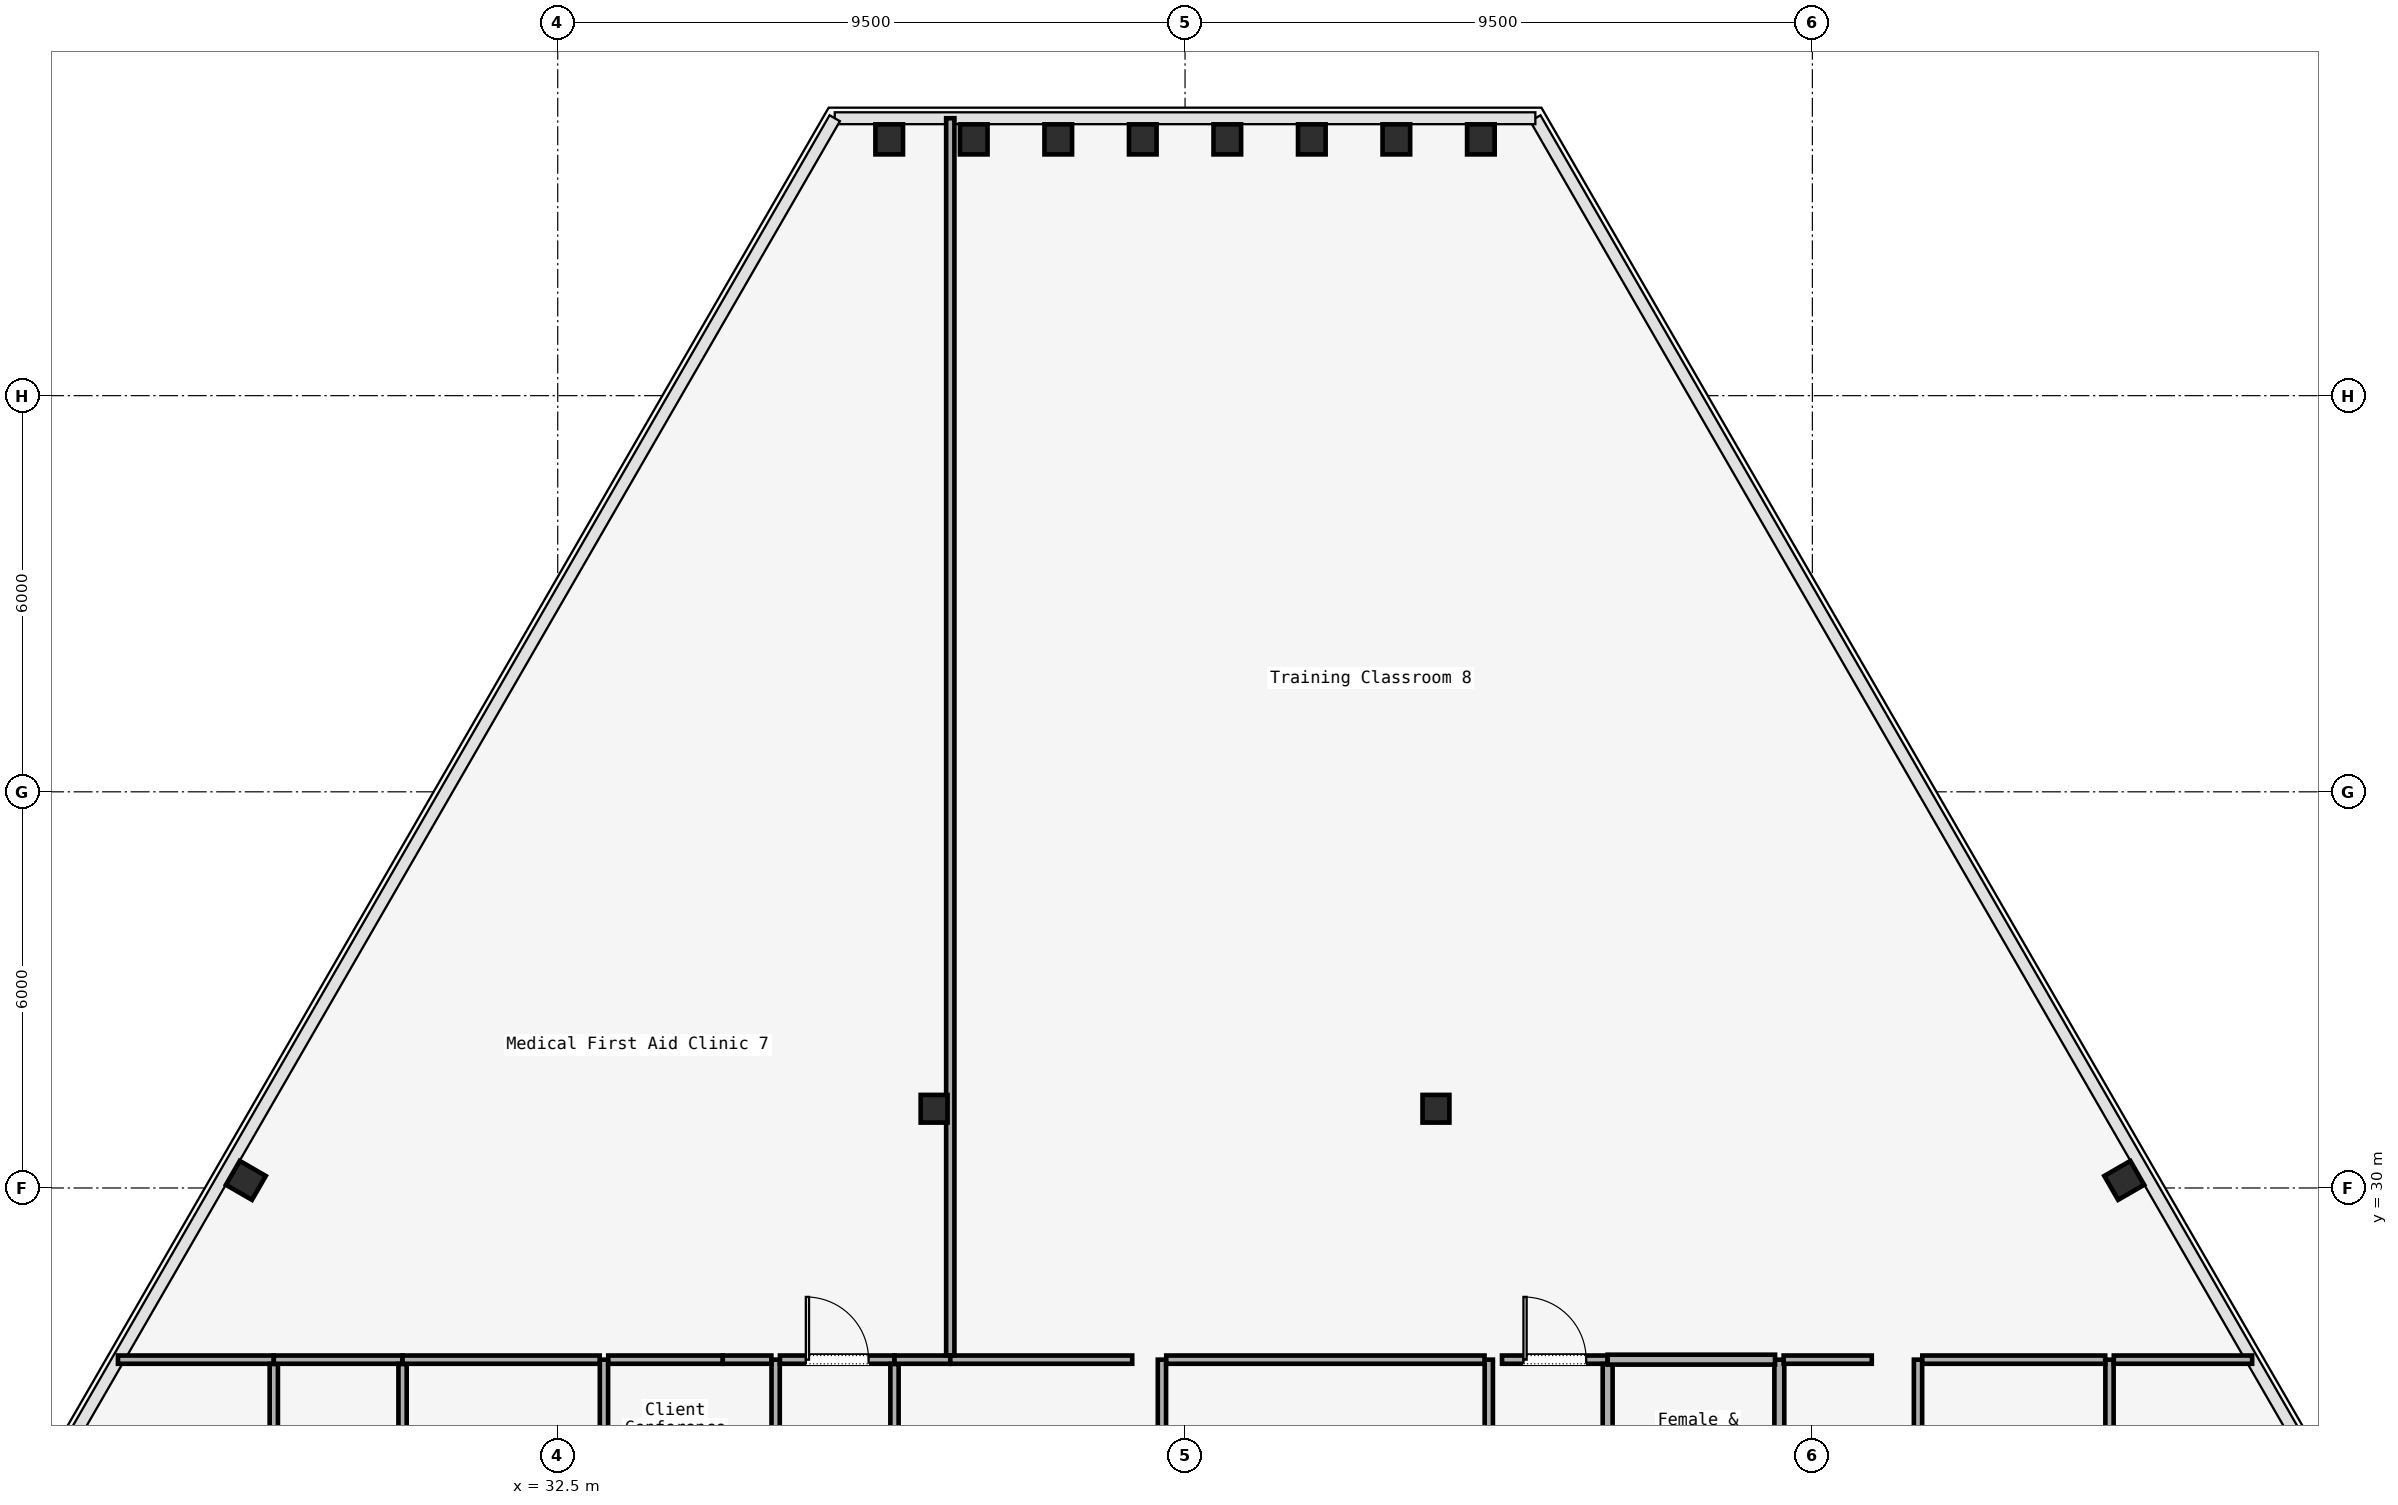
"""IFC4 building model, lengths in metres.
Left out: names, types, materials, properties, quantities, classifications, styles, units other than length and angle.
Written with IfcOpenShell. Run it as: python <this file> out.ifc"""

import sys

from ifc_helpers import new_model, si_unit, direction, frame, frame_2d, origin, origin_2d, place, context, subcontext, project, spatial, rectangle, i_section, extrude, element, fill, save


model = new_model("IFC4")
c1 = context("Model", 3, precision=1e-05, world=origin(), true_north=direction((0.0, 1.0)))
c2 = subcontext(c1, "Body", "Model", "MODEL_VIEW")
j1 = project(units=[si_unit("LENGTHUNIT", "METRE"), si_unit("PLANEANGLEUNIT", "RADIAN")], contexts=[c1])
p1 = place(None, origin())
s1 = spatial("IfcSite", under=j1, at=p1, CompositionType="ELEMENT")
p2 = place(p1, origin())
s2 = spatial("IfcBuilding", under=s1, at=p2, CompositionType="ELEMENT")
p3 = place(p2, frame((0.0, 0.0, 161.2)))
s3 = spatial("IfcBuildingStorey", under=s2, at=p3, CompositionType="ELEMENT", Elevation=161.2)
for number, where, z_axis, x_axis in (
    (1, (38.2, 31.2, 0.0), (0.0, 0.0, 1.0), (1.0, 0.0, 0.0)),
    (2, (45.8, 31.2, 0.0), (0.0, 0.0, 1.0), (1.0, 0.0, 0.0)),
):
    element("IfcColumn", number, at=place(p3, frame(where, z_axis=z_axis, x_axis=x_axis)), inside=s3, PredefinedType="COLUMN", context=c2, shape_type="SweptSolid", body=[
        extrude(i_section(OverallWidth=0.407, OverallDepth=0.419, WebThickness=0.031, FlangeThickness=0.049, FilletRadius=0.015, at=origin_2d()), origin(), (0.0, 0.0, 1.0), 3.58),
    ])
for number, where, z_axis, x_axis in (
    (3, (56.223, 30.115, 0.0), (0.0, 0.0, 1.0), (-0.5, 0.866, 0.0)),
    (4, (46.48, 45.882, 0.0), (0.0, 0.0, 1.0), (1.0, 0.0, 0.0)),
    (5, (45.2, 45.882, 0.0), (0.0, 0.0, 1.0), (1.0, 0.0, 0.0)),
    (6, (43.92, 45.882, 0.0), (0.0, 0.0, 1.0), (1.0, 0.0, 0.0)),
    (7, (42.64, 45.882, 0.0), (0.0, 0.0, 1.0), (1.0, 0.0, 0.0)),
    (8, (41.36, 45.882, 0.0), (0.0, 0.0, 1.0), (1.0, 0.0, 0.0)),
    (9, (40.08, 45.882, 0.0), (0.0, 0.0, 1.0), (1.0, 0.0, 0.0)),
    (10, (38.8, 45.882, 0.0), (0.0, 0.0, 1.0), (1.0, 0.0, 0.0)),
    (11, (37.52, 45.882, 0.0), (0.0, 0.0, 1.0), (1.0, 0.0, 0.0)),
    (12, (27.777, 30.115, 0.0), (0.0, 0.0, 1.0), (0.5, 0.866, 0.0)),
):
    element("IfcColumn", number, at=place(p3, frame(where, z_axis=z_axis, x_axis=x_axis)), inside=s3, PredefinedType="COLUMN", context=c2, shape_type="SweptSolid", body=[
        extrude(i_section(OverallWidth=0.418, OverallDepth=0.455, WebThickness=0.042, FlangeThickness=0.052, FilletRadius=0.015, at=origin_2d()), origin(), (0.0, 0.0, 1.0), 3.58),
    ])
p4 = place(p3, frame((35.8, 21.368, 0.0), z_axis=(0.0, 0.0, 1.0), x_axis=(0.0, 1.0, 0.0)))
e13 = element("IfcWall", 13, at=p4, inside=s3, PredefinedType="PARTITIONING", context=c2, shape_type="SweptSolid", body=[
    extrude(rectangle(XDim=6.032, YDim=0.125, at=frame_2d((3.016, 0.0))), origin(), (0.0, 0.0, 1.0), 3.01),
])
p5 = place(p4, frame((2.766, 0.0, 0.0)))
e14 = element("IfcOpeningElement", 14, at=p5, cuts=e13, PredefinedType="OPENING", context=c2, shape_type="SweptSolid", body=[
    extrude(rectangle(XDim=1.4, YDim=2.2, at=frame_2d((0.7, 1.1))), frame((0.0, 0.062, 0.0), z_axis=(0.0, -1.0, 0.0), x_axis=(1.0, 0.0, 0.0)), (0.0, 0.0, 1.0), 0.125),
])
p6 = place(p3, frame((35.865, 27.4, 0.0), z_axis=(0.0, 0.0, 1.0), x_axis=(1.0, 0.0, 0.0)))
e15 = element("IfcWall", 15, at=p6, inside=s3, PredefinedType="PARTITIONING", context=c2, shape_type="SweptSolid", body=[
    extrude(rectangle(XDim=1.735, YDim=0.125, at=frame_2d((0.868, 0.0))), origin(), (0.0, 0.0, 1.0), 3.01),
])
p7 = place(p6, frame((0.393, 0.0, 0.0)))
e16 = element("IfcOpeningElement", 16, at=p7, cuts=e15, PredefinedType="OPENING", context=c2, shape_type="SweptSolid", body=[
    extrude(rectangle(XDim=0.95, YDim=2.2, at=frame_2d((0.475, 1.1))), frame((0.0, 0.062, 0.0), z_axis=(0.0, -1.0, 0.0), x_axis=(1.0, 0.0, 0.0)), (0.0, 0.0, 1.0), 0.125),
])
p8 = place(p3, frame((37.6, 27.335, 0.0), z_axis=(0.0, 0.0, 1.0), x_axis=(0.0, -1.0, 0.0)))
e17 = element("IfcWall", 17, at=p8, inside=s3, PredefinedType="PARTITIONING", context=c2, shape_type="SweptSolid", body=[
    extrude(rectangle(XDim=5.655, YDim=0.125, at=frame_2d((2.828, 0.0))), origin(), (0.0, 0.0, 1.0), 3.01),
])
p9 = place(p8, frame((2.353, 0.0, 0.0)))
e18 = element("IfcOpeningElement", 18, at=p9, cuts=e17, PredefinedType="OPENING", context=c2, shape_type="SweptSolid", body=[
    extrude(rectangle(XDim=0.95, YDim=2.2, at=frame_2d((0.475, 1.1))), frame((0.0, 0.062, 0.0), z_axis=(0.0, -1.0, 0.0), x_axis=(1.0, 0.0, 0.0)), (0.0, 0.0, 1.0), 0.125),
])
p10 = place(p3, frame((46.6, 24.254, 0.0), z_axis=(0.0, 0.0, 1.0), x_axis=(0.0, 1.0, 0.0)))
e19 = element("IfcWall", 19, at=p10, inside=s3, PredefinedType="PARTITIONING", context=c2, shape_type="SweptSolid", body=[
    extrude(rectangle(XDim=3.146, YDim=0.125, at=frame_2d((1.573, 0.0))), origin(), (0.0, 0.0, 1.0), 3.01),
])
p11 = place(p10, frame((1.098, 0.0, 0.0)))
e20 = element("IfcOpeningElement", 20, at=p11, cuts=e19, PredefinedType="OPENING", context=c2, shape_type="SweptSolid", body=[
    extrude(rectangle(XDim=0.95, YDim=2.2, at=frame_2d((0.475, 1.1))), frame((0.0, 0.062, 0.0), z_axis=(0.0, -1.0, 0.0), x_axis=(1.0, 0.0, 0.0)), (0.0, 0.0, 1.0), 0.125),
])
p12 = place(p3, frame((46.8, 27.4, 0.0), z_axis=(0.0, 0.0, 1.0), x_axis=(1.0, 0.0, 0.0)))
e21 = element("IfcWall", 21, at=p12, inside=s3, PredefinedType="PARTITIONING", context=c2, shape_type="SweptSolid", body=[
    extrude(rectangle(XDim=1.6, YDim=0.125, at=frame_2d((0.8, 0.0))), origin(), (0.0, 0.0, 1.0), 3.01),
])
p13 = place(p12, frame((0.325, 0.0, 0.0)))
e22 = element("IfcOpeningElement", 22, at=p13, cuts=e21, PredefinedType="OPENING", context=c2, shape_type="SweptSolid", body=[
    extrude(rectangle(XDim=0.95, YDim=2.2, at=frame_2d((0.475, 1.1))), frame((0.0, 0.062, 0.0), z_axis=(0.0, -1.0, 0.0), x_axis=(1.0, 0.0, 0.0)), (0.0, 0.0, 1.0), 0.125),
])
p14 = place(p3, frame((48.4, 27.335, 0.0), z_axis=(0.0, 0.0, 1.0), x_axis=(0.0, -1.0, 0.0)))
e23 = element("IfcWall", 23, at=p14, inside=s3, PredefinedType="PARTITIONING", context=c2, shape_type="SweptSolid", body=[
    extrude(rectangle(XDim=6.279, YDim=0.15, at=frame_2d((3.14, 0.0))), origin(), (0.0, 0.0, 1.0), 3.01),
])
p15 = place(p14, frame((2.24, 0.0, 0.0)))
e24 = element("IfcOpeningElement", 24, at=p15, cuts=e23, PredefinedType="OPENING", context=c2, shape_type="SweptSolid", body=[
    extrude(rectangle(XDim=0.9, YDim=2.15, at=frame_2d((0.45, 1.075))), frame((0.0, 0.075, 0.0), z_axis=(0.0, -1.0, 0.0), x_axis=(1.0, 0.0, 0.0)), (0.0, 0.0, 1.0), 0.15),
])
p16 = place(p3, frame((56.0, 17.065, 0.0), z_axis=(0.0, 0.0, 1.0), x_axis=(0.0, 1.0, 0.0)))
e25 = element("IfcWall", 25, at=p16, inside=s3, PredefinedType="PARTITIONING", context=c2, shape_type="SweptSolid", body=[
    extrude(rectangle(XDim=10.335, YDim=0.125, at=frame_2d((5.167, 0.0))), origin(), (0.0, 0.0, 1.0), 3.01),
])
p17 = place(p3, frame((56.065, 27.4, 0.0), z_axis=(0.0, 0.0, 1.0), x_axis=(1.0, 0.0, 0.0)))
e26 = element("IfcWall", 26, at=p17, inside=s3, PredefinedType="PARTITIONING", context=c2, shape_type="SweptSolid", body=[
    extrude(rectangle(XDim=2.095, YDim=0.125, at=frame_2d((1.048, 0.0))), origin(), (0.0, 0.0, 1.0), 3.01),
])
p18 = place(p3, frame((25.84, 27.4, 0.0), z_axis=(0.0, 0.0, 1.0), x_axis=(1.0, 0.0, 0.0)))
e27 = element("IfcWall", 27, at=p18, inside=s3, PredefinedType="PARTITIONING", context=c2, shape_type="SweptSolid", body=[
    extrude(rectangle(XDim=2.36, YDim=0.125, at=frame_2d((1.18, 0.0))), origin(), (0.0, 0.0, 1.0), 3.01),
])
p19 = place(p3, frame((28.2, 27.335, 0.0), z_axis=(0.0, 0.0, 1.0), x_axis=(0.0, -1.0, 0.0)))
e28 = element("IfcWall", 28, at=p19, inside=s3, PredefinedType="PARTITIONING", context=c2, shape_type="SweptSolid", body=[
    extrude(rectangle(XDim=10.27, YDim=0.125, at=frame_2d((5.135, 0.0))), origin(), (0.0, 0.0, 1.0), 3.01),
])
p20 = place(p3, frame((28.2, 27.4, 0.0), z_axis=(0.0, 0.0, 1.0), x_axis=(1.0, 0.0, 0.0)))
e29 = element("IfcWall", 29, at=p20, inside=s3, PredefinedType="PARTITIONING", context=c2, shape_type="SweptSolid", body=[
    extrude(rectangle(XDim=1.95, YDim=0.125, at=frame_2d((0.975, 0.0))), origin(), (0.0, 0.0, 1.0), 3.01),
])
p21 = place(p3, frame((30.15, 27.335, 0.0), z_axis=(0.0, 0.0, 1.0), x_axis=(0.0, -1.0, 0.0)))
e30 = element("IfcWall", 30, at=p21, inside=s3, PredefinedType="PARTITIONING", context=c2, shape_type="SweptSolid", body=[
    extrude(rectangle(XDim=10.27, YDim=0.125, at=frame_2d((5.135, 0.0))), origin(), (0.0, 0.0, 1.0), 3.01),
])
p22 = place(p3, frame((33.2, 27.4, 0.0), z_axis=(0.0, 0.0, 1.0), x_axis=(0.0, -1.0, 0.0)))
e31 = element("IfcWall", 31, at=p22, inside=s3, PredefinedType="PARTITIONING", context=c2, shape_type="SweptSolid", body=[
    extrude(rectangle(XDim=5.967, YDim=0.125, at=frame_2d((2.983, 0.0))), origin(), (0.0, 0.0, 1.0), 3.01),
])
p23 = place(p3, frame((30.15, 27.4, 0.0), z_axis=(0.0, 0.0, 1.0), x_axis=(1.0, 0.0, 0.0)))
e32 = element("IfcWall", 32, at=p23, inside=s3, PredefinedType="PARTITIONING", context=c2, shape_type="SweptSolid", body=[
    extrude(rectangle(XDim=2.985, YDim=0.125, at=frame_2d((1.493, 0.0))), origin(), (0.0, 0.0, 1.0), 3.01),
])
p24 = place(p3, frame((51.0, 21.121, 0.0), z_axis=(0.0, 0.0, 1.0), x_axis=(0.0, 1.0, 0.0)))
e33 = element("IfcWall", 33, at=p24, inside=s3, PredefinedType="PARTITIONING", context=c2, shape_type="SweptSolid", body=[
    extrude(rectangle(XDim=6.279, YDim=0.15, at=frame_2d((3.139, 0.0))), origin(), (0.0, 0.0, 1.0), 3.01),
])
p25 = place(p3, frame((51.065, 27.4, 0.0), z_axis=(0.0, 0.0, 1.0), x_axis=(1.0, 0.0, 0.0)))
e34 = element("IfcWall", 34, at=p25, inside=s3, PredefinedType="PARTITIONING", context=c2, shape_type="SweptSolid", body=[
    extrude(rectangle(XDim=1.335, YDim=0.125, at=frame_2d((0.667, 0.0))), origin(), (0.0, 0.0, 1.0), 3.01),
])
p26 = place(p3, frame((53.1, 27.4, 0.0), z_axis=(0.0, 0.0, 1.0), x_axis=(0.0, -1.0, 0.0)))
e35 = element("IfcWall", 35, at=p26, inside=s3, PredefinedType="PARTITIONING", context=c2, shape_type="SweptSolid", body=[
    extrude(rectangle(XDim=10.335, YDim=0.125, at=frame_2d((5.167, 0.0))), origin(), (0.0, 0.0, 1.0), 3.01),
])
p27 = place(p3, frame((53.165, 27.4, 0.0), z_axis=(0.0, 0.0, 1.0), x_axis=(1.0, 0.0, 0.0)))
e36 = element("IfcWall", 36, at=p27, inside=s3, PredefinedType="PARTITIONING", context=c2, shape_type="SweptSolid", body=[
    extrude(rectangle(XDim=2.77, YDim=0.125, at=frame_2d((1.385, 0.0))), origin(), (0.0, 0.0, 1.0), 3.01),
])
p28 = place(p3, frame((48.4, 27.4, 0.0), z_axis=(0.0, 0.0, 1.0), x_axis=(1.0, 0.0, 0.0)))
e37 = element("IfcWall", 37, at=p28, inside=s3, PredefinedType="PARTITIONING", context=c2, shape_type="SweptSolid", body=[
    extrude(rectangle(XDim=2.535, YDim=0.15, at=frame_2d((1.268, 0.0))), origin(), (0.0, 0.0, 1.0), 3.01),
])
p29 = place(p3, frame((33.265, 27.4, 0.0), z_axis=(0.0, 0.0, 1.0), x_axis=(1.0, 0.0, 0.0)))
e38 = element("IfcWall", 38, at=p29, inside=s3, PredefinedType="PARTITIONING", context=c2, shape_type="SweptSolid", body=[
    extrude(rectangle(XDim=1.735, YDim=0.125, at=frame_2d((0.868, 0.0))), origin(), (0.0, 0.0, 1.0), 3.01),
])
p30 = place(p3, frame((35.0, 27.4, 0.0), z_axis=(0.0, 0.0, 1.0), x_axis=(1.0, 0.0, 0.0)))
e39 = element("IfcWall", 39, at=p30, inside=s3, PredefinedType="PARTITIONING", context=c2, shape_type="SweptSolid", body=[
    extrude(rectangle(XDim=0.735, YDim=0.125, at=frame_2d((0.368, 0.0))), origin(), (0.0, 0.0, 1.0), 3.01),
])
p31 = place(p3, frame((41.65, 27.4, 0.0), z_axis=(0.0, 0.0, 1.0), x_axis=(0.0, -1.0, 0.0)))
e40 = element("IfcWall", 40, at=p31, inside=s3, PredefinedType="PARTITIONING", context=c2, shape_type="SweptSolid", body=[
    extrude(rectangle(XDim=3.146, YDim=0.125, at=frame_2d((1.573, 0.0))), origin(), (0.0, 0.0, 1.0), 3.01),
])
p32 = place(p3, frame((37.6, 27.4, 0.0), z_axis=(0.0, 0.0, 1.0), x_axis=(1.0, 0.0, 0.0)))
e41 = element("IfcWall", 41, at=p32, inside=s3, PredefinedType="PARTITIONING", context=c2, shape_type="SweptSolid", body=[
    extrude(rectangle(XDim=0.845, YDim=0.125, at=frame_2d((0.422, 0.0))), origin(), (0.0, 0.0, 1.0), 3.01),
])
p33 = place(p3, frame((38.445, 27.4, 0.0), z_axis=(0.0, 0.0, 1.0), x_axis=(1.0, 0.0, 0.0)))
e42 = element("IfcWall", 42, at=p33, inside=s3, PredefinedType="PARTITIONING", context=c2, shape_type="SweptSolid", body=[
    extrude(rectangle(XDim=2.755, YDim=0.125, at=frame_2d((1.377, 0.0))), origin(), (0.0, 0.0, 1.0), 3.01),
])
p34 = place(p3, frame((41.715, 27.4, 0.0), z_axis=(0.0, 0.0, 1.0), x_axis=(1.0, 0.0, 0.0)))
e43 = element("IfcWall", 43, at=p34, inside=s3, PredefinedType="PARTITIONING", context=c2, shape_type="SweptSolid", body=[
    extrude(rectangle(XDim=4.82, YDim=0.125, at=frame_2d((2.41, 0.0))), origin(), (0.0, 0.0, 1.0), 3.01),
])
p35 = place(p3, frame((38.445, 46.202, 0.0), z_axis=(0.0, 0.0, 1.0), x_axis=(0.0, -1.0, 0.0)))
e44 = element("IfcWall", 44, at=p35, inside=s3, PredefinedType="PARTITIONING", context=c2, shape_type="SweptSolid", body=[
    extrude(rectangle(XDim=18.737, YDim=0.125, at=frame_2d((9.368, 0.0))), origin(), (0.0, 0.0, 1.0), 3.01),
])
p36 = place(p7, origin())
e45 = element("IfcDoor", 45, at=p36, inside=s3, OperationType="SINGLE_SWING_RIGHT", PredefinedType="DOOR", context=c2, shape_type="SweptSolid", body=[
    extrude(rectangle(XDim=0.95, YDim=2.2, at=frame_2d((0.475, 1.1))), frame((0.0, 0.025, 0.0), z_axis=(0.0, -1.0, 0.0), x_axis=(1.0, 0.0, 0.0)), (0.0, 0.0, 1.0), 0.05),
])
fill(e16, e45)
p37 = place(p13, origin())
e46 = element("IfcDoor", 46, at=p37, inside=s3, OperationType="SINGLE_SWING_LEFT", PredefinedType="DOOR", context=c2, shape_type="SweptSolid", body=[
    extrude(rectangle(XDim=0.95, YDim=2.2, at=frame_2d((0.475, 1.1))), frame((0.0, 0.025, 0.0), z_axis=(0.0, -1.0, 0.0), x_axis=(1.0, 0.0, 0.0)), (0.0, 0.0, 1.0), 0.05),
])
fill(e22, e46)
save(model, sys.argv[1])
